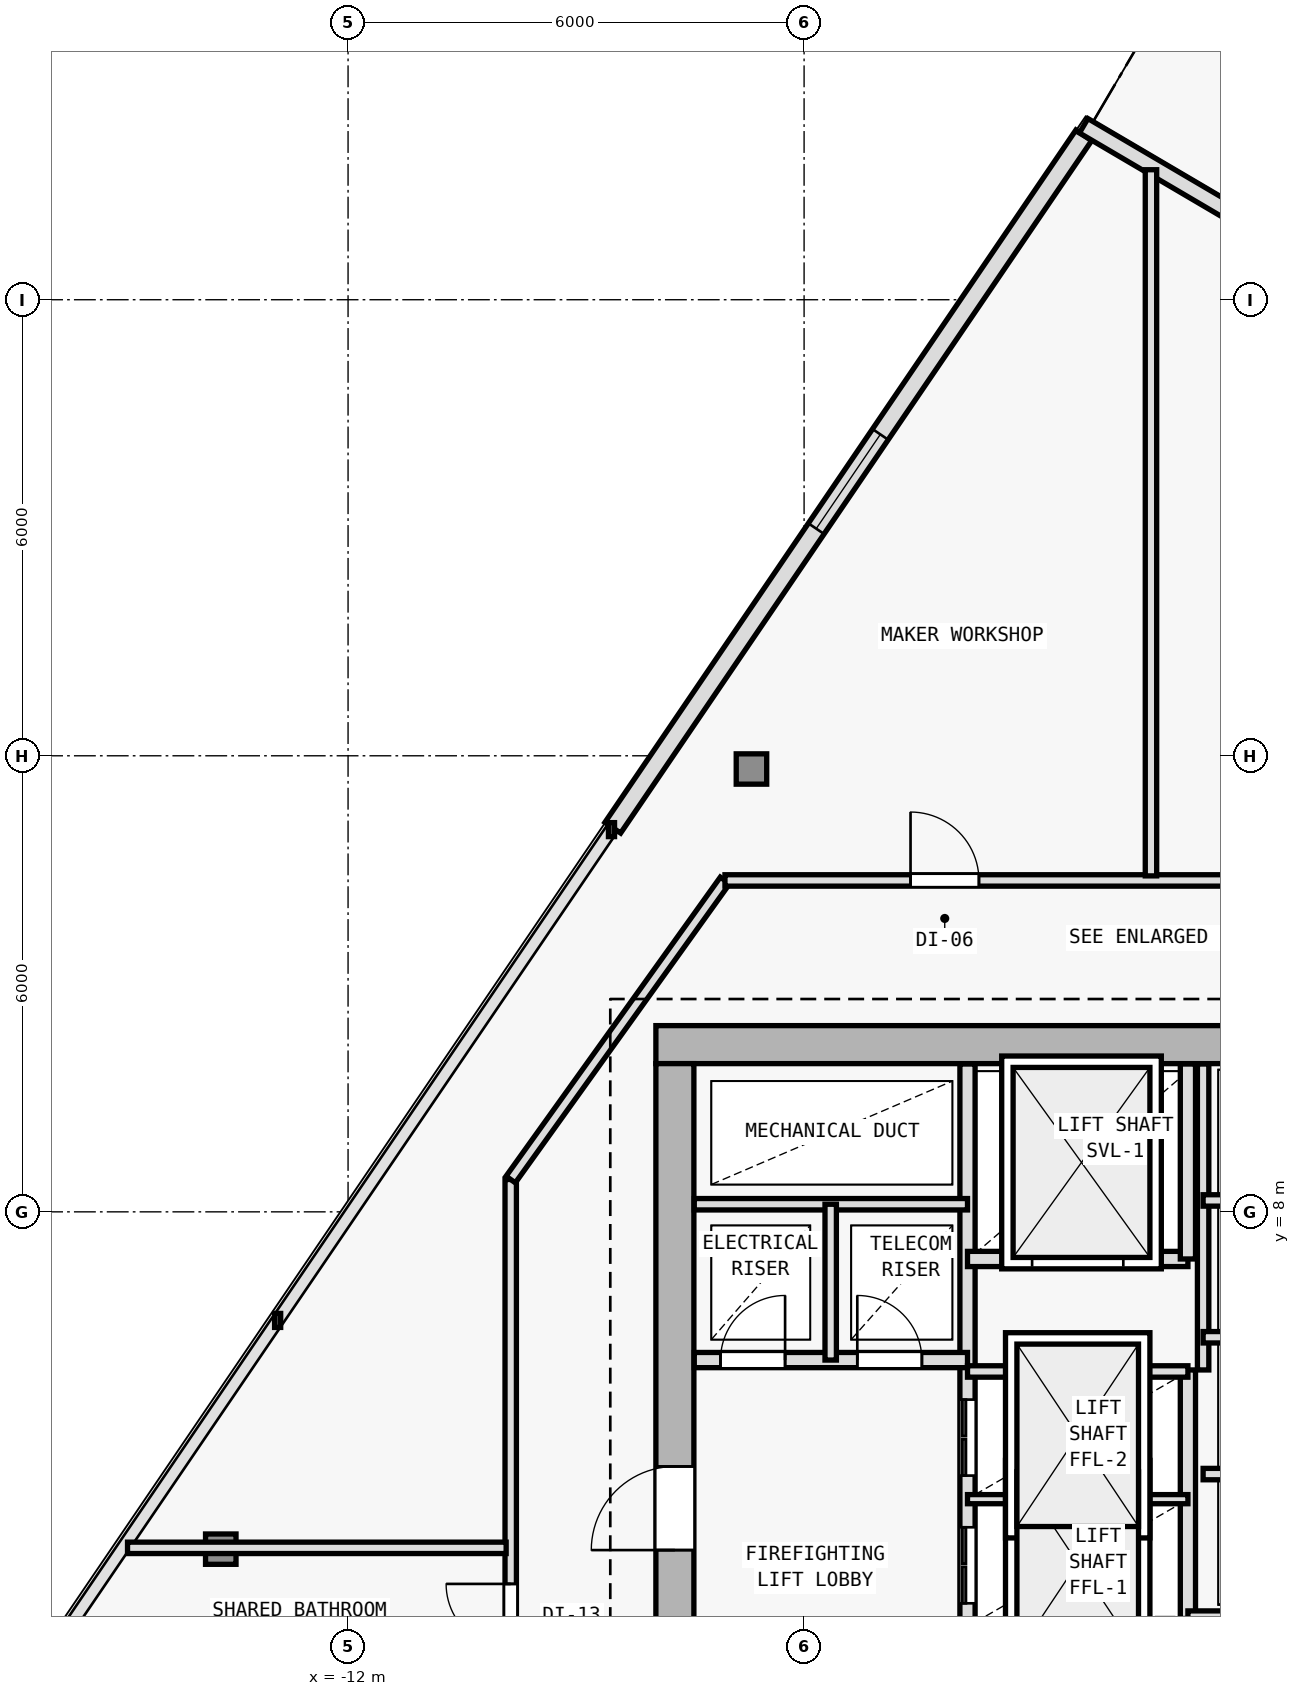
"""IFC4 building model, lengths in metres.
Left out: names, types, materials, properties, quantities, classifications, styles, units other than length and angle.
Written with IfcOpenShell. Run it as: python <this file> out.ifc"""

import sys

from ifc_helpers import new_model, si_unit, direction, frame, frame_2d, origin, origin_2d, place, context, subcontext, project, spatial, rectangle, i_section, extrude, element, fill, save


model = new_model("IFC4")
c1 = context("Model", 3, precision=1e-05, world=origin(), true_north=direction((0.0, 1.0)))
c2 = subcontext(c1, "Body", "Model", "MODEL_VIEW")
j1 = project(units=[si_unit("LENGTHUNIT", "METRE"), si_unit("PLANEANGLEUNIT", "RADIAN")], contexts=[c1])
p1 = place(None, origin())
s1 = spatial("IfcSite", under=j1, at=p1, CompositionType="ELEMENT")
p2 = place(p1, origin())
s2 = spatial("IfcBuilding", under=s1, at=p2, CompositionType="ELEMENT")
p3 = place(p2, frame((0.0, 0.0, 178.2)))
s3 = spatial("IfcBuildingStorey", under=s2, at=p3, CompositionType="ELEMENT", Elevation=178.2)
p4 = place(p3, frame((-7.7, 10.2, 0.0), z_axis=(0.0, 0.0, 1.0), x_axis=(1.0, 0.0, 0.0)))
e1 = element("IfcColumn", 1, at=p4, inside=s3, PredefinedType="COLUMN", context=c2, shape_type="SweptSolid", body=[
    extrude(i_section(OverallWidth=0.404, OverallDepth=0.407, WebThickness=0.017, FlangeThickness=0.028, FilletRadius=0.015, at=origin_2d()), origin(), (0.0, 0.0, 1.0), 3.6),
])
p5 = place(p3, frame((-6.692, 13.826, 0.006), z_axis=(0.008775143007, -0.002584925847, 0.999958156636), x_axis=(0.282568886397, 0.959247009086, 0.0)))
e2 = element("IfcColumn", 2, at=p5, inside=s3, PredefinedType="COLUMN", context=c2, shape_type="SweptSolid", body=[
    extrude(i_section(OverallWidth=0.401, OverallDepth=0.399, WebThickness=0.016, FlangeThickness=0.025, FilletRadius=0.015, at=origin_2d()), origin(), (0.0, 0.0, 1.0), 3.589),
])
p6 = place(p3, frame((-13.675, 3.562, 0.006), z_axis=(0.017071567417, 0.009521989794, 0.999808928394), x_axis=(-0.487119351792, 0.873335409284, 0.0)))
e3 = element("IfcColumn", 3, at=p6, inside=s3, PredefinedType="COLUMN", context=c2, shape_type="SweptSolid", body=[
    extrude(i_section(OverallWidth=0.401, OverallDepth=0.399, WebThickness=0.016, FlangeThickness=0.025, FilletRadius=0.015, at=origin_2d()), origin(), (0.0, 0.0, 1.0), 3.59),
])
p7 = place(p3, frame((-8.517, 13.053, 0.0), z_axis=(0.0, 0.0, 1.0), x_axis=(0.562463961516, 0.826821801838, 0.0)))
e4 = element("IfcWall", 4, at=p7, inside=s3, PredefinedType="SOLIDWALL", context=c2, shape_type="SweptSolid", body=[
    extrude(rectangle(XDim=11.018, YDim=0.25, at=frame_2d((5.509, 0.0))), origin(), (0.0, 0.0, 1.0), 3.35),
])
p8 = place(p7, frame((4.759, 0.0, 0.62)))
e5 = element("IfcOpeningElement", 5, at=p8, cuts=e4, PredefinedType="OPENING", context=c2, shape_type="SweptSolid", body=[
    extrude(rectangle(XDim=1.5, YDim=2.0, at=frame_2d((0.75, 1.0))), frame((0.0, 0.135, 0.0), z_axis=(0.0, -1.0, 0.0), x_axis=(1.0, 0.0, 0.0)), (0.0, 0.0, 1.0), 0.27),
])
p9 = place(p3, frame((-2.322, 22.289, 0.0), z_axis=(0.0, 0.0, 1.0), x_axis=(0.862111523483, -0.506718581738, 0.0)))
e6 = element("IfcWall", 6, at=p9, inside=s3, PredefinedType="SOLIDWALL", context=c2, shape_type="SweptSolid", body=[
    extrude(rectangle(XDim=4.777, YDim=0.22, at=frame_2d((2.389, 0.0))), origin(), (0.0, 0.0, 1.0), 3.35),
])
p10 = place(p9, frame((2.714, 0.0, 0.0)))
e7 = element("IfcOpeningElement", 7, at=p10, cuts=e6, PredefinedType="OPENING", context=c2, shape_type="SweptSolid", body=[
    extrude(rectangle(XDim=1.05, YDim=2.15, at=frame_2d((0.525, 1.075))), frame((0.0, 0.12, 0.0), z_axis=(0.0, -1.0, 0.0), x_axis=(1.0, 0.0, 0.0)), (0.0, 0.0, 1.0), 0.24),
])
p11 = place(p3, frame((7.95, 10.2, 0.0), z_axis=(0.0, 0.0, 1.0), x_axis=(-1.0, 0.0, 0.0)))
e8 = element("IfcWall", 8, at=p11, inside=s3, PredefinedType="SHEAR", context=c2, shape_type="SweptSolid", body=[
    extrude(rectangle(XDim=15.9, YDim=0.5, at=frame_2d((7.95, 0.0))), origin(), (0.0, 0.0, 1.0), 3.35),
])
p12 = place(p11, frame((4.4, 0.0, 0.0)))
e9 = element("IfcOpeningElement", 9, at=p12, cuts=e8, PredefinedType="OPENING", context=c2, shape_type="SweptSolid", body=[
    extrude(rectangle(XDim=1.1, YDim=2.15, at=frame_2d((0.55, 1.075))), frame((0.0, 0.26, 0.0), z_axis=(0.0, -1.0, 0.0), x_axis=(1.0, 0.0, 0.0)), (0.0, 0.0, 1.0), 0.52),
])
p13 = place(p3, frame((-7.7, -9.15, 0.0), z_axis=(0.0, 0.0, 1.0), x_axis=(0.0, 1.0, 0.0)))
e10 = element("IfcWall", 10, at=p13, inside=s3, PredefinedType="SHEAR", context=c2, shape_type="SweptSolid", body=[
    extrude(rectangle(XDim=19.1, YDim=0.5, at=frame_2d((9.55, 0.0))), origin(), (0.0, 0.0, 1.0), 3.35),
])
p14 = place(p13, frame((12.7, 0.0, 0.0)))
e11 = element("IfcOpeningElement", 11, at=p14, cuts=e10, PredefinedType="OPENING", context=c2, shape_type="SweptSolid", body=[
    extrude(rectangle(XDim=1.1, YDim=2.15, at=frame_2d((0.55, 1.075))), frame((0.0, 0.26, 0.0), z_axis=(0.0, -1.0, 0.0), x_axis=(1.0, 0.0, 0.0)), (0.0, 0.0, 1.0), 0.52),
])
p15 = place(p3, frame((-3.85, 1.35, 0.0), z_axis=(0.0, 0.0, 1.0), x_axis=(0.0, 1.0, 0.0)))
e12 = element("IfcWall", 12, at=p15, inside=s3, PredefinedType="SOLIDWALL", context=c2, shape_type="SweptSolid", body=[
    extrude(rectangle(XDim=8.595, YDim=0.2, at=frame_2d((4.297, 0.0))), origin(), (0.0, 0.0, 1.0), 3.35),
])
p16 = place(p15, frame((1.5, 0.0, 0.0)))
e13 = element("IfcOpeningElement", 13, at=p16, cuts=e12, PredefinedType="OPENING", context=c2, shape_type="SweptSolid", body=[
    extrude(rectangle(XDim=1.0, YDim=2.15, at=frame_2d((0.5, 1.075))), frame((0.0, 0.11, 0.0), z_axis=(0.0, -1.0, 0.0), x_axis=(1.0, 0.0, 0.0)), (0.0, 0.0, 1.0), 0.22),
])
p17 = place(p15, frame((3.18, 0.0, 0.0)))
e14 = element("IfcOpeningElement", 14, at=p17, cuts=e12, PredefinedType="OPENING", context=c2, shape_type="SweptSolid", body=[
    extrude(rectangle(XDim=1.0, YDim=2.15, at=frame_2d((0.5, 1.075))), frame((0.0, 0.11, 0.0), z_axis=(0.0, -1.0, 0.0), x_axis=(1.0, 0.0, 0.0)), (0.0, 0.0, 1.0), 0.22),
])
p18 = place(p3, frame((-7.445, 6.05, 0.0), z_axis=(0.0, 0.0, 1.0), x_axis=(1.0, 0.0, 0.0)))
e15 = element("IfcWall", 15, at=p18, inside=s3, PredefinedType="SOLIDWALL", context=c2, shape_type="SweptSolid", body=[
    extrude(rectangle(XDim=3.595, YDim=0.2, at=frame_2d((1.797, 0.0))), origin(), (0.0, 0.0, 1.0), 3.35),
])
p19 = place(p18, frame((0.345, 0.0, 0.0)))
e16 = element("IfcOpeningElement", 16, at=p19, cuts=e15, PredefinedType="OPENING", context=c2, shape_type="SweptSolid", body=[
    extrude(rectangle(XDim=0.85, YDim=2.1, at=frame_2d((0.425, 1.05))), frame((0.0, 0.11, 0.0), z_axis=(0.0, -1.0, 0.0), x_axis=(1.0, 0.0, 0.0)), (0.0, 0.0, 1.0), 0.22),
])
p20 = place(p18, frame((2.145, 0.0, 0.0)))
e17 = element("IfcOpeningElement", 17, at=p20, cuts=e15, PredefinedType="OPENING", context=c2, shape_type="SweptSolid", body=[
    extrude(rectangle(XDim=0.85, YDim=2.1, at=frame_2d((0.425, 1.05))), frame((0.0, 0.11, 0.0), z_axis=(0.0, -1.0, 0.0), x_axis=(1.0, 0.0, 0.0)), (0.0, 0.0, 1.0), 0.22),
])
p21 = place(p3, frame((-7.445, 8.1, 0.0), z_axis=(0.0, 0.0, 1.0), x_axis=(1.0, 0.0, 0.0)))
e18 = element("IfcWall", 18, at=p21, inside=s3, PredefinedType="PARTITIONING", context=c2, shape_type="SweptSolid", body=[
    extrude(rectangle(XDim=3.595, YDim=0.15, at=frame_2d((1.797, 0.0))), origin(), (0.0, 0.0, 1.0), 3.35),
])
p22 = place(p3, frame((-5.65, 6.05, 0.0), z_axis=(0.0, 0.0, 1.0), x_axis=(0.0, 1.0, 0.0)))
e19 = element("IfcWall", 19, at=p22, inside=s3, PredefinedType="PARTITIONING", context=c2, shape_type="SweptSolid", body=[
    extrude(rectangle(XDim=2.05, YDim=0.15, at=frame_2d((1.025, 0.0))), origin(), (0.0, 0.0, 1.0), 3.35),
])
p23 = place(p3, frame((-0.95, 2.65, 0.0), z_axis=(0.0, 0.0, 1.0), x_axis=(0.0, 1.0, 0.0)))
e20 = element("IfcWall", 20, at=p23, inside=s3, PredefinedType="SOLIDWALL", context=c2, shape_type="SweptSolid", body=[
    extrude(rectangle(XDim=3.27, YDim=0.2, at=frame_2d((1.635, 0.0))), origin(), (0.0, 0.0, 1.0), 3.35),
])
p24 = place(p3, frame((-3.85, 4.22, 0.0), z_axis=(0.0, 0.0, 1.0), x_axis=(1.0, 0.0, 0.0)))
e21 = element("IfcWall", 21, at=p24, inside=s3, PredefinedType="PARTITIONING", context=c2, shape_type="SweptSolid", body=[
    extrude(rectangle(XDim=2.9, YDim=0.12, at=frame_2d((1.45, 0.0))), origin(), (0.0, 0.0, 1.0), 3.35),
])
p25 = place(p3, frame((-3.85, 5.9, 0.0), z_axis=(0.0, 0.0, 1.0), x_axis=(1.0, 0.0, 0.0)))
e22 = element("IfcWall", 22, at=p25, inside=s3, PredefinedType="PARTITIONING", context=c2, shape_type="SweptSolid", body=[
    extrude(rectangle(XDim=2.9, YDim=0.15, at=frame_2d((1.45, 0.0))), origin(), (0.0, 0.0, 1.0), 3.35),
])
p26 = place(p3, frame((-3.85, 7.38, 0.0), z_axis=(0.0, 0.0, 1.0), x_axis=(1.0, 0.0, 0.0)))
e23 = element("IfcWall", 23, at=p26, inside=s3, PredefinedType="SOLIDWALL", context=c2, shape_type="SweptSolid", body=[
    extrude(rectangle(XDim=2.9, YDim=0.2, at=frame_2d((1.45, 0.0))), origin(), (0.0, 0.0, 1.0), 3.35),
])
p27 = place(p26, frame((0.85, 0.0, 0.0)))
e24 = element("IfcOpeningElement", 24, at=p27, cuts=e23, PredefinedType="OPENING", context=c2, shape_type="SweptSolid", body=[
    extrude(rectangle(XDim=1.2, YDim=2.2, at=frame_2d((0.6, 1.1))), frame((0.0, 0.11, 0.0), z_axis=(0.0, -1.0, 0.0), x_axis=(1.0, 0.0, 0.0)), (0.0, 0.0, 1.0), 0.22),
])
p28 = place(p3, frame((-0.95, 7.38, 0.0), z_axis=(0.0, 0.0, 1.0), x_axis=(0.0, 1.0, 0.0)))
e25 = element("IfcWall", 25, at=p28, inside=s3, PredefinedType="SOLIDWALL", context=c2, shape_type="SweptSolid", body=[
    extrude(rectangle(XDim=2.565, YDim=0.2, at=frame_2d((1.283, 0.0))), origin(), (0.0, 0.0, 1.0), 3.35),
])
p29 = place(p3, frame((-0.95, 2.65, 0.0), z_axis=(0.0, 0.0, 1.0), x_axis=(1.0, 0.0, 0.0)))
e26 = element("IfcWall", 26, at=p29, inside=s3, PredefinedType="SOLIDWALL", context=c2, shape_type="SweptSolid", body=[
    extrude(rectangle(XDim=2.9, YDim=0.2, at=frame_2d((1.45, 0.0))), origin(), (0.0, 0.0, 1.0), 3.35),
])
p30 = place(p3, frame((-0.75, 5.92, 0.0), z_axis=(0.0, 0.0, 1.0), x_axis=(0.0, 1.0, 0.0)))
e27 = element("IfcWall", 27, at=p30, inside=s3, PredefinedType="PARTITIONING", context=c2, shape_type="SweptSolid", body=[
    extrude(rectangle(XDim=4.025, YDim=0.15, at=frame_2d((2.013, 0.0))), origin(), (0.0, 0.0, 1.0), 3.35),
])
for number, where, z_axis, x_axis in (
    (28, (-0.75, 4.55, 0.0), (0.0, 0.0, 1.0), (1.0, 0.0, 0.0)),
    (29, (-0.75, 6.35, 0.0), (0.0, 0.0, 1.0), (1.0, 0.0, 0.0)),
    (30, (-0.75, 8.15, 0.0), (0.0, 0.0, 1.0), (1.0, 0.0, 0.0)),
):
    element("IfcWall", number, at=place(p3, frame(where, z_axis=z_axis, x_axis=x_axis)), inside=s3, PredefinedType="PARTITIONING", context=c2, shape_type="SweptSolid", body=[
        extrude(rectangle(XDim=2.7, YDim=0.15, at=frame_2d((1.35, 0.0))), origin(), (0.0, 0.0, 1.0), 3.35),
    ])
p31 = place(p3, frame((-9.86, -11.56, 0.0), z_axis=(0.0, 0.0, 1.0), x_axis=(0.0, 1.0, 0.0)))
e31 = element("IfcWall", 31, at=p31, inside=s3, PredefinedType="PARTITIONING", context=c2, shape_type="SweptSolid", body=[
    extrude(rectangle(XDim=19.986, YDim=0.15, at=frame_2d((9.993, 0.0))), origin(), (0.0, 0.0, 1.0), 2.825),
])
p32 = place(p31, frame((10.942, 0.0, 0.0)))
e32 = element("IfcOpeningElement", 32, at=p32, cuts=e31, PredefinedType="OPENING", context=c2, shape_type="SweptSolid", body=[
    extrude(rectangle(XDim=0.85, YDim=2.1, at=frame_2d((0.425, 1.05))), frame((0.0, 0.085, 0.0), z_axis=(0.0, -1.0, 0.0), x_axis=(1.0, 0.0, 0.0)), (0.0, 0.0, 1.0), 0.17),
])
p33 = place(p31, frame((8.965, 0.0, 0.0)))
e33 = element("IfcOpeningElement", 33, at=p33, cuts=e31, PredefinedType="OPENING", context=c2, shape_type="SweptSolid", body=[
    extrude(rectangle(XDim=0.9, YDim=2.1, at=frame_2d((0.45, 1.05))), frame((0.0, 0.085, 0.0), z_axis=(0.0, -1.0, 0.0), x_axis=(1.0, 0.0, 0.0)), (0.0, 0.0, 1.0), 0.17),
])
p34 = place(p31, frame((6.134, 0.0, 0.0)))
e34 = element("IfcOpeningElement", 34, at=p34, cuts=e31, PredefinedType="OPENING", context=c2, shape_type="SweptSolid", body=[
    extrude(rectangle(XDim=0.9, YDim=2.1, at=frame_2d((0.45, 1.05))), frame((0.0, 0.085, 0.0), z_axis=(0.0, -1.0, 0.0), x_axis=(1.0, 0.0, 0.0)), (0.0, 0.0, 1.0), 0.17),
])
p35 = place(p31, frame((2.088, 0.0, 0.0)))
e35 = element("IfcOpeningElement", 35, at=p35, cuts=e31, PredefinedType="OPENING", context=c2, shape_type="SweptSolid", body=[
    extrude(rectangle(XDim=0.9, YDim=2.1, at=frame_2d((0.45, 1.05))), frame((0.0, 0.085, 0.0), z_axis=(0.0, -1.0, 0.0), x_axis=(1.0, 0.0, 0.0)), (0.0, 0.0, 1.0), 0.17),
])
p36 = place(p31, frame((13.815, 0.0, 0.0)))
e36 = element("IfcOpeningElement", 36, at=p36, cuts=e31, PredefinedType="OPENING", context=c2, shape_type="SweptSolid", body=[
    extrude(rectangle(XDim=0.85, YDim=2.1, at=frame_2d((0.425, 1.05))), frame((0.0, 0.085, 0.0), z_axis=(0.0, -1.0, 0.0), x_axis=(1.0, 0.0, 0.0)), (0.0, 0.0, 1.0), 0.17),
])
p37 = place(p31, frame((12.357, 0.0, 0.0)))
e37 = element("IfcOpeningElement", 37, at=p37, cuts=e31, PredefinedType="OPENING", context=c2, shape_type="SweptSolid", body=[
    extrude(rectangle(XDim=0.85, YDim=2.1, at=frame_2d((0.425, 1.05))), frame((0.0, 0.085, 0.0), z_axis=(0.0, -1.0, 0.0), x_axis=(1.0, 0.0, 0.0)), (0.0, 0.0, 1.0), 0.17),
])
p38 = place(p3, frame((-9.86, 8.426, 0.0), z_axis=(0.0, 0.0, 1.0), x_axis=(0.582449511476, 0.812866881218, 0.0)))
e38 = element("IfcWall", 38, at=p38, inside=s3, PredefinedType="PARTITIONING", context=c2, shape_type="SweptSolid", body=[
    extrude(rectangle(XDim=4.84, YDim=0.15, at=frame_2d((2.42, 0.0))), origin(), (0.0, 0.0, 1.0), 3.005),
])
p39 = place(p3, frame((-7.041, 12.36, 0.0), z_axis=(0.0, 0.0, 1.0), x_axis=(1.0, 0.0, 0.0)))
e39 = element("IfcWall", 39, at=p39, inside=s3, PredefinedType="PARTITIONING", context=c2, shape_type="SweptSolid", body=[
    extrude(rectangle(XDim=14.064, YDim=0.15, at=frame_2d((7.032, 0.0))), origin(), (0.0, 0.0, 1.0), 3.005),
])
p40 = place(p39, frame((9.296, 0.0, 0.0)))
e40 = element("IfcOpeningElement", 40, at=p40, cuts=e39, PredefinedType="OPENING", context=c2, shape_type="SweptSolid", body=[
    extrude(rectangle(XDim=0.9, YDim=2.1, at=frame_2d((0.45, 1.05))), frame((0.0, 0.085, 0.0), z_axis=(0.0, -1.0, 0.0), x_axis=(1.0, 0.0, 0.0)), (0.0, 0.0, 1.0), 0.17),
])
p41 = place(p39, frame((2.442, 0.0, 0.0)))
e41 = element("IfcOpeningElement", 41, at=p41, cuts=e39, PredefinedType="OPENING", context=c2, shape_type="SweptSolid", body=[
    extrude(rectangle(XDim=0.9, YDim=2.1, at=frame_2d((0.45, 1.05))), frame((0.0, 0.085, 0.0), z_axis=(0.0, -1.0, 0.0), x_axis=(1.0, 0.0, 0.0)), (0.0, 0.0, 1.0), 0.17),
])
p42 = place(p3, frame((-9.92, 3.58, 0.0), z_axis=(0.0, 0.0, 1.0), x_axis=(-1.0, 0.0, 0.0)))
e42 = element("IfcWall", 42, at=p42, inside=s3, PredefinedType="PARTITIONING", context=c2, shape_type="SweptSolid", body=[
    extrude(rectangle(XDim=4.982, YDim=0.15, at=frame_2d((2.491, 0.0))), origin(), (0.0, 0.0, 1.0), 2.935),
])
p43 = place(p3, frame((-1.436, 12.42, 0.0), z_axis=(0.0, 0.0, 1.0), x_axis=(0.0, 1.0, 0.0)))
e43 = element("IfcWall", 43, at=p43, inside=s3, PredefinedType="PARTITIONING", context=c2, shape_type="SweptSolid", body=[
    extrude(rectangle(XDim=9.29, YDim=0.15, at=frame_2d((4.645, 0.0))), origin(), (0.0, 0.0, 1.0), 2.935),
])
p44 = place(p8, origin())
e44 = element("IfcWindow", 44, at=p44, inside=s3, PartitioningType="SINGLE_PANEL", PredefinedType="WINDOW", context=c2, shape_type="SweptSolid", body=[
    extrude(rectangle(XDim=1.5, YDim=2.0, at=frame_2d((0.75, 1.0))), frame((0.0, 0.03, 0.0), z_axis=(0.0, -1.0, 0.0), x_axis=(1.0, 0.0, 0.0)), (0.0, 0.0, 1.0), 0.06),
])
fill(e5, e44)
p45 = place(p14, origin())
e45 = element("IfcDoor", 45, at=p45, inside=s3, OperationType="SINGLE_SWING_LEFT", PredefinedType="DOOR", context=c2, shape_type="SweptSolid", body=[
    extrude(rectangle(XDim=1.1, YDim=2.15, at=frame_2d((0.55, 1.075))), frame((0.0, 0.025, 0.0), z_axis=(0.0, -1.0, 0.0), x_axis=(1.0, 0.0, 0.0)), (0.0, 0.0, 1.0), 0.05),
])
fill(e11, e45)
p46 = place(p19, origin())
e46 = element("IfcDoor", 46, at=p46, inside=s3, OperationType="SINGLE_SWING_RIGHT", PredefinedType="DOOR", context=c2, shape_type="SweptSolid", body=[
    extrude(rectangle(XDim=0.85, YDim=2.1, at=frame_2d((0.425, 1.05))), frame((0.0, 0.025, 0.0), z_axis=(0.0, -1.0, 0.0), x_axis=(1.0, 0.0, 0.0)), (0.0, 0.0, 1.0), 0.05),
])
fill(e16, e46)
p47 = place(p20, origin())
e47 = element("IfcDoor", 47, at=p47, inside=s3, OperationType="SINGLE_SWING_LEFT", PredefinedType="DOOR", context=c2, shape_type="SweptSolid", body=[
    extrude(rectangle(XDim=0.85, YDim=2.1, at=frame_2d((0.425, 1.05))), frame((0.0, 0.025, 0.0), z_axis=(0.0, -1.0, 0.0), x_axis=(1.0, 0.0, 0.0)), (0.0, 0.0, 1.0), 0.05),
])
fill(e17, e47)
p48 = place(p27, origin())
e48 = element("IfcDoor", 48, at=p48, inside=s3, OperationType="DOUBLE_DOOR_SLIDING", PredefinedType="DOOR", context=c2, shape_type="SweptSolid", body=[
    extrude(rectangle(XDim=1.2, YDim=2.2, at=frame_2d((0.6, 1.1))), frame((0.0, 0.025, 0.0), z_axis=(0.0, -1.0, 0.0), x_axis=(1.0, 0.0, 0.0)), (0.0, 0.0, 1.0), 0.05),
])
fill(e24, e48)
p49 = place(p16, origin())
e49 = element("IfcDoor", 49, at=p49, inside=s3, OperationType="DOUBLE_DOOR_SLIDING", PredefinedType="DOOR", context=c2, shape_type="SweptSolid", body=[
    extrude(rectangle(XDim=1.0, YDim=2.15, at=frame_2d((0.5, 1.075))), frame((0.0, 0.025, 0.0), z_axis=(0.0, -1.0, 0.0), x_axis=(1.0, 0.0, 0.0)), (0.0, 0.0, 1.0), 0.05),
])
fill(e13, e49)
p50 = place(p17, origin())
e50 = element("IfcDoor", 50, at=p50, inside=s3, OperationType="DOUBLE_DOOR_SLIDING", PredefinedType="DOOR", context=c2, shape_type="SweptSolid", body=[
    extrude(rectangle(XDim=1.0, YDim=2.15, at=frame_2d((0.5, 1.075))), frame((0.0, 0.025, 0.0), z_axis=(0.0, -1.0, 0.0), x_axis=(1.0, 0.0, 0.0)), (0.0, 0.0, 1.0), 0.05),
])
fill(e14, e50)
p51 = place(p41, origin())
e51 = element("IfcDoor", 51, at=p51, inside=s3, OperationType="SINGLE_SWING_LEFT", PredefinedType="DOOR", context=c2, shape_type="SweptSolid", body=[
    extrude(rectangle(XDim=0.9, YDim=2.1, at=frame_2d((0.45, 1.05))), frame((0.0, 0.025, 0.0), z_axis=(0.0, -1.0, 0.0), x_axis=(1.0, 0.0, 0.0)), (0.0, 0.0, 1.0), 0.05),
])
fill(e41, e51)
p52 = place(p36, origin())
e52 = element("IfcDoor", 52, at=p52, inside=s3, OperationType="SINGLE_SWING_RIGHT", PredefinedType="DOOR", context=c2, shape_type="SweptSolid", body=[
    extrude(rectangle(XDim=0.85, YDim=2.1, at=frame_2d((0.425, 1.05))), frame((0.0, 0.025, 0.0), z_axis=(0.0, -1.0, 0.0), x_axis=(1.0, 0.0, 0.0)), (0.0, 0.0, 1.0), 0.05),
])
fill(e36, e52)
save(model, sys.argv[1])
